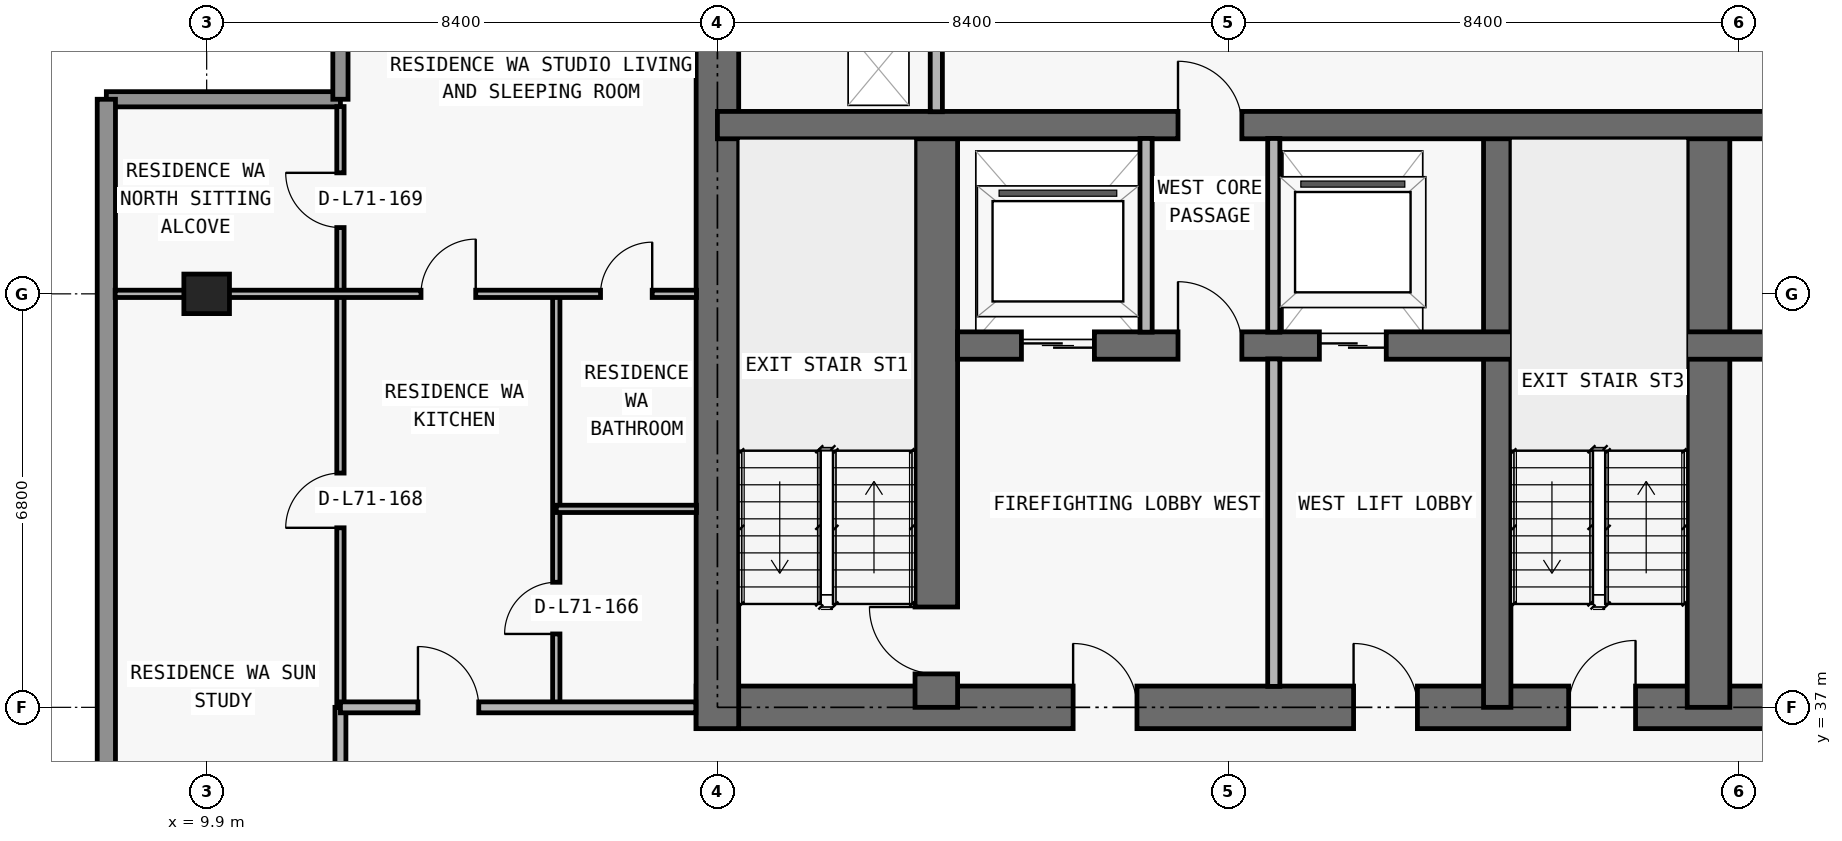
"""IFC4 building model, lengths in metres.
Left out: names, types, materials, properties, quantities, classifications, styles, units other than length and angle.
Written with IfcOpenShell. Run it as: python <this file> out.ifc"""

import sys

from ifc_helpers import new_model, si_unit, direction, frame, frame_2d, origin, origin_2d, place, context, subcontext, project, spatial, rectangle, extrude, element, fill, save


model = new_model("IFC4")
c1 = context("Model", 3, precision=1e-05, world=origin(), true_north=direction((0.0, 1.0)))
c2 = subcontext(c1, "Body", "Model", "MODEL_VIEW")
j1 = project(units=[si_unit("LENGTHUNIT", "METRE"), si_unit("PLANEANGLEUNIT", "RADIAN")], contexts=[c1])
p1 = place(None, origin())
s1 = spatial("IfcSite", under=j1, at=p1, CompositionType="ELEMENT")
p2 = place(p1, origin())
s2 = spatial("IfcBuilding", under=s1, at=p2, CompositionType="ELEMENT")
p3 = place(p2, frame((0.0, 0.0, 252.9)))
s3 = spatial("IfcBuildingStorey", under=s2, at=p3, CompositionType="ELEMENT", Elevation=252.9)
p4 = place(p3, frame((9.9, 43.8, 0.0), z_axis=(0.0, 0.0, 1.0), x_axis=(1.0, 0.0, 0.0)))
e1 = element("IfcColumn", 1, at=p4, inside=s3, PredefinedType="COLUMN", context=c2, shape_type="SweptSolid", body=[
    extrude(rectangle(XDim=0.75, YDim=0.65, at=origin_2d()), origin(), (0.0, 0.0, 1.0), 3.05),
])
p5 = place(p3, frame((17.95, 37.0, 0.0), z_axis=(0.0, 0.0, 1.0), x_axis=(1.0, 0.0, 0.0)))
e2 = element("IfcWall", 2, at=p5, inside=s3, PredefinedType="SHEAR", context=c2, shape_type="SweptSolid", body=[
    extrude(rectangle(XDim=41.9, YDim=0.7, at=frame_2d((20.95, 0.0))), origin(), (0.0, 0.0, 1.0), 3.05),
])
p6 = place(p5, frame((14.35, 0.0, 0.0)))
e3 = element("IfcOpeningElement", 3, at=p6, cuts=e2, PredefinedType="OPENING", context=c2, shape_type="SweptSolid", body=[
    extrude(rectangle(XDim=1.1, YDim=2.15, at=frame_2d((0.55, 1.075))), frame((0.0, 0.36, 0.0), z_axis=(0.0, -1.0, 0.0), x_axis=(1.0, 0.0, 0.0)), (0.0, 0.0, 1.0), 0.72),
])
p7 = place(p5, frame((6.2, 0.0, 0.0)))
e4 = element("IfcOpeningElement", 4, at=p7, cuts=e2, PredefinedType="OPENING", context=c2, shape_type="SweptSolid", body=[
    extrude(rectangle(XDim=1.05, YDim=2.15, at=frame_2d((0.525, 1.075))), frame((0.0, 0.36, 0.0), z_axis=(0.0, -1.0, 0.0), x_axis=(1.0, 0.0, 0.0)), (0.0, 0.0, 1.0), 0.72),
])
p8 = place(p5, frame((34.7, 0.0, 0.0)))
e5 = element("IfcOpeningElement", 5, at=p8, cuts=e2, PredefinedType="OPENING", context=c2, shape_type="SweptSolid", body=[
    extrude(rectangle(XDim=1.05, YDim=2.15, at=frame_2d((0.525, 1.075))), frame((0.0, 0.36, 0.0), z_axis=(0.0, -1.0, 0.0), x_axis=(1.0, 0.0, 0.0)), (0.0, 0.0, 1.0), 0.72),
])
p9 = place(p5, frame((10.812, 0.0, 0.0)))
e6 = element("IfcOpeningElement", 6, at=p9, cuts=e2, PredefinedType="OPENING", context=c2, shape_type="SweptSolid", body=[
    extrude(rectangle(XDim=1.05, YDim=2.15, at=frame_2d((0.525, 1.075))), frame((0.0, 0.36, 0.0), z_axis=(0.0, -1.0, 0.0), x_axis=(1.0, 0.0, 0.0)), (0.0, 0.0, 1.0), 0.72),
])
p10 = place(p5, frame((24.05, 0.0, 0.0)))
e7 = element("IfcOpeningElement", 7, at=p10, cuts=e2, PredefinedType="OPENING", context=c2, shape_type="SweptSolid", body=[
    extrude(rectangle(XDim=1.05, YDim=2.15, at=frame_2d((0.525, 1.075))), frame((0.0, 0.36, 0.0), z_axis=(0.0, -1.0, 0.0), x_axis=(1.0, 0.0, 0.0)), (0.0, 0.0, 1.0), 0.72),
])
p11 = place(p3, frame((18.3, 36.65, 0.0), z_axis=(0.0, 0.0, 1.0), x_axis=(0.0, 1.0, 0.0)))
e8 = element("IfcWall", 8, at=p11, inside=s3, PredefinedType="SHEAR", context=c2, shape_type="SweptSolid", body=[
    extrude(rectangle(XDim=13.95, YDim=0.7, at=frame_2d((6.975, 0.0))), origin(), (0.0, 0.0, 1.0), 3.05),
])
p12 = place(p3, frame((21.9, 37.0, 0.0), z_axis=(0.0, 0.0, 1.0), x_axis=(0.0, 1.0, 0.0)))
e9 = element("IfcWall", 9, at=p12, inside=s3, PredefinedType="SHEAR", context=c2, shape_type="SweptSolid", body=[
    extrude(rectangle(XDim=9.575, YDim=0.7, at=frame_2d((4.788, 0.0))), origin(), (0.0, 0.0, 1.0), 3.05),
])
p13 = place(p12, frame((0.55, 0.0, 0.0)))
e10 = element("IfcOpeningElement", 10, at=p13, cuts=e9, PredefinedType="OPENING", context=c2, shape_type="SweptSolid", body=[
    extrude(rectangle(XDim=1.1, YDim=2.15, at=frame_2d((0.55, 1.075))), frame((0.0, 0.36, 0.0), z_axis=(0.0, -1.0, 0.0), x_axis=(1.0, 0.0, 0.0)), (0.0, 0.0, 1.0), 0.72),
])
p14 = place(p3, frame((31.125, 37.0, 0.0), z_axis=(0.0, 0.0, 1.0), x_axis=(0.0, 1.0, 0.0)))
e11 = element("IfcWall", 11, at=p14, inside=s3, PredefinedType="SHEAR", context=c2, shape_type="SweptSolid", body=[
    extrude(rectangle(XDim=9.575, YDim=0.45, at=frame_2d((4.788, 0.0))), origin(), (0.0, 0.0, 1.0), 3.05),
])
p15 = place(p3, frame((34.6, 37.0, 0.0), z_axis=(0.0, 0.0, 1.0), x_axis=(0.0, 1.0, 0.0)))
e12 = element("IfcWall", 12, at=p15, inside=s3, PredefinedType="SHEAR", context=c2, shape_type="SweptSolid", body=[
    extrude(rectangle(XDim=9.575, YDim=0.7, at=frame_2d((4.788, 0.0))), origin(), (0.0, 0.0, 1.0), 3.05),
])
p16 = place(p3, frame((22.25, 42.95, 0.0), z_axis=(0.0, 0.0, 1.0), x_axis=(1.0, 0.0, 0.0)))
e13 = element("IfcWall", 13, at=p16, inside=s3, PredefinedType="SHEAR", context=c2, shape_type="SweptSolid", body=[
    extrude(rectangle(XDim=33.3, YDim=0.45, at=frame_2d((16.65, 0.0))), origin(), (0.0, 0.0, 1.0), 3.05),
])
p17 = place(p16, frame((1.05, 0.0, 0.0)))
e14 = element("IfcOpeningElement", 14, at=p17, cuts=e13, PredefinedType="OPENING", context=c2, shape_type="SweptSolid", body=[
    extrude(rectangle(XDim=1.2, YDim=2.2, at=frame_2d((0.6, 1.1))), frame((0.0, 0.235, 0.0), z_axis=(0.0, -1.0, 0.0), x_axis=(1.0, 0.0, 0.0)), (0.0, 0.0, 1.0), 0.47),
])
p18 = place(p16, frame((31.05, 0.0, 0.0)))
e15 = element("IfcOpeningElement", 15, at=p18, cuts=e13, PredefinedType="OPENING", context=c2, shape_type="SweptSolid", body=[
    extrude(rectangle(XDim=1.2, YDim=2.2, at=frame_2d((0.6, 1.1))), frame((0.0, 0.235, 0.0), z_axis=(0.0, -1.0, 0.0), x_axis=(1.0, 0.0, 0.0)), (0.0, 0.0, 1.0), 0.47),
])
p19 = place(p16, frame((26.45, 0.0, 0.0)))
e16 = element("IfcOpeningElement", 16, at=p19, cuts=e13, PredefinedType="OPENING", context=c2, shape_type="SweptSolid", body=[
    extrude(rectangle(XDim=1.1, YDim=2.2, at=frame_2d((0.55, 1.1))), frame((0.0, 0.235, 0.0), z_axis=(0.0, -1.0, 0.0), x_axis=(1.0, 0.0, 0.0)), (0.0, 0.0, 1.0), 0.47),
])
p20 = place(p16, frame((5.95, 0.0, 0.0)))
e17 = element("IfcOpeningElement", 17, at=p20, cuts=e13, PredefinedType="OPENING", context=c2, shape_type="SweptSolid", body=[
    extrude(rectangle(XDim=1.1, YDim=2.2, at=frame_2d((0.55, 1.1))), frame((0.0, 0.235, 0.0), z_axis=(0.0, -1.0, 0.0), x_axis=(1.0, 0.0, 0.0)), (0.0, 0.0, 1.0), 0.47),
])
p21 = place(p16, frame((3.625, 0.0, 0.0)))
e18 = element("IfcOpeningElement", 18, at=p21, cuts=e13, PredefinedType="OPENING", context=c2, shape_type="SweptSolid", body=[
    extrude(rectangle(XDim=1.05, YDim=2.15, at=frame_2d((0.525, 1.075))), frame((0.0, 0.235, 0.0), z_axis=(0.0, -1.0, 0.0), x_axis=(1.0, 0.0, 0.0)), (0.0, 0.0, 1.0), 0.47),
])
p22 = place(p16, frame((28.675, 0.0, 0.0)))
e19 = element("IfcOpeningElement", 19, at=p22, cuts=e13, PredefinedType="OPENING", context=c2, shape_type="SweptSolid", body=[
    extrude(rectangle(XDim=1.05, YDim=2.15, at=frame_2d((0.525, 1.075))), frame((0.0, 0.235, 0.0), z_axis=(0.0, -1.0, 0.0), x_axis=(1.0, 0.0, 0.0)), (0.0, 0.0, 1.0), 0.47),
])
p23 = place(p16, frame((15.225, 0.0, 0.0)))
e20 = element("IfcOpeningElement", 20, at=p23, cuts=e13, PredefinedType="OPENING", context=c2, shape_type="SweptSolid", body=[
    extrude(rectangle(XDim=1.0, YDim=2.2, at=frame_2d((0.5, 1.1))), frame((0.0, 0.235, 0.0), z_axis=(0.0, -1.0, 0.0), x_axis=(1.0, 0.0, 0.0)), (0.0, 0.0, 1.0), 0.47),
])
p24 = place(p16, frame((21.975, 0.0, 0.0)))
e21 = element("IfcOpeningElement", 21, at=p24, cuts=e13, PredefinedType="OPENING", context=c2, shape_type="SweptSolid", body=[
    extrude(rectangle(XDim=1.0, YDim=2.2, at=frame_2d((0.5, 1.1))), frame((0.0, 0.235, 0.0), z_axis=(0.0, -1.0, 0.0), x_axis=(1.0, 0.0, 0.0)), (0.0, 0.0, 1.0), 0.47),
])
p25 = place(p3, frame((18.3, 46.575, 0.0), z_axis=(0.0, 0.0, 1.0), x_axis=(1.0, 0.0, 0.0)))
e22 = element("IfcWall", 22, at=p25, inside=s3, PredefinedType="SHEAR", context=c2, shape_type="SweptSolid", body=[
    extrude(rectangle(XDim=41.2, YDim=0.45, at=frame_2d((20.6, 0.0))), origin(), (0.0, 0.0, 1.0), 3.05),
])
p26 = place(p25, frame((7.575, 0.0, 0.0)))
e23 = element("IfcOpeningElement", 23, at=p26, cuts=e22, PredefinedType="OPENING", context=c2, shape_type="SweptSolid", body=[
    extrude(rectangle(XDim=1.05, YDim=2.15, at=frame_2d((0.525, 1.075))), frame((0.0, 0.235, 0.0), z_axis=(0.0, -1.0, 0.0), x_axis=(1.0, 0.0, 0.0)), (0.0, 0.0, 1.0), 0.47),
])
p27 = place(p25, frame((32.625, 0.0, 0.0)))
e24 = element("IfcOpeningElement", 24, at=p27, cuts=e22, PredefinedType="OPENING", context=c2, shape_type="SweptSolid", body=[
    extrude(rectangle(XDim=1.05, YDim=2.15, at=frame_2d((0.525, 1.075))), frame((0.0, 0.235, 0.0), z_axis=(0.0, -1.0, 0.0), x_axis=(1.0, 0.0, 0.0)), (0.0, 0.0, 1.0), 0.47),
])
p28 = place(p3, frame((8.25, 47.0, 0.0), z_axis=(0.0, 0.0, 1.0), x_axis=(1.0, 0.0, 0.0)))
e25 = element("IfcWall", 25, at=p28, inside=s3, PredefinedType="ELEMENTEDWALL", context=c2, shape_type="SweptSolid", body=[
    extrude(rectangle(XDim=3.85, YDim=0.25, at=frame_2d((1.925, 0.0))), origin(), (0.0, 0.0, 1.0), 3.05),
])
p29 = place(p3, frame((12.1, 47.0, 0.0), z_axis=(0.0, 0.0, 1.0), x_axis=(0.0, 1.0, 0.0)))
e26 = element("IfcWall", 26, at=p29, inside=s3, PredefinedType="ELEMENTEDWALL", context=c2, shape_type="SweptSolid", body=[
    extrude(rectangle(XDim=3.45, YDim=0.25, at=frame_2d((1.725, 0.0))), origin(), (0.0, 0.0, 1.0), 3.05),
])
p30 = place(p3, frame((8.25, 30.15, 0.0), z_axis=(0.0, 0.0, 1.0), x_axis=(0.0, 1.0, 0.0)))
e27 = element("IfcWall", 27, at=p30, inside=s3, PredefinedType="STANDARD", context=c2, shape_type="SweptSolid", body=[
    extrude(rectangle(XDim=16.85, YDim=0.3, at=frame_2d((8.425, 0.0))), origin(), (0.0, 0.0, 1.0), 3.05),
])
p31 = place(p3, frame((12.1, 34.705, 0.0), z_axis=(0.0, 0.0, 1.0), x_axis=(0.0, 1.0, 0.0)))
e28 = element("IfcWall", 28, at=p31, inside=s3, PredefinedType="PARTITIONING", context=c2, shape_type="SweptSolid", body=[
    extrude(rectangle(XDim=2.295, YDim=0.18, at=frame_2d((1.147, 0.0))), origin(), (0.0, 0.0, 1.0), 3.05),
])
p32 = place(p3, frame((12.1, 37.005, 0.0), z_axis=(0.0, 0.0, 1.0), x_axis=(0.0, 1.0, 0.0)))
e29 = element("IfcWall", 29, at=p32, inside=s3, PredefinedType="PARTITIONING", context=c2, shape_type="SweptSolid", body=[
    extrude(rectangle(XDim=9.875, YDim=0.12, at=frame_2d((4.938, 0.0))), origin(), (0.0, 0.0, 1.0), 3.05),
])
p33 = place(p32, frame((2.948, 0.0, 0.0)))
e30 = element("IfcOpeningElement", 30, at=p33, cuts=e29, PredefinedType="OPENING", context=c2, shape_type="SweptSolid", body=[
    extrude(rectangle(XDim=0.9, YDim=2.15, at=frame_2d((0.45, 1.075))), frame((0.0, 0.07, 0.0), z_axis=(0.0, -1.0, 0.0), x_axis=(1.0, 0.0, 0.0)), (0.0, 0.0, 1.0), 0.14),
])
p34 = place(p32, frame((7.885, 0.0, 0.0)))
e31 = element("IfcOpeningElement", 31, at=p34, cuts=e29, PredefinedType="OPENING", context=c2, shape_type="SweptSolid", body=[
    extrude(rectangle(XDim=0.9, YDim=2.15, at=frame_2d((0.45, 1.075))), frame((0.0, 0.07, 0.0), z_axis=(0.0, -1.0, 0.0), x_axis=(1.0, 0.0, 0.0)), (0.0, 0.0, 1.0), 0.14),
])
p35 = place(p3, frame((15.65, 37.0, 0.0), z_axis=(0.0, 0.0, 1.0), x_axis=(0.0, 1.0, 0.0)))
e32 = element("IfcWall", 32, at=p35, inside=s3, PredefinedType="PARTITIONING", context=c2, shape_type="SweptSolid", body=[
    extrude(rectangle(XDim=6.8, YDim=0.12, at=frame_2d((3.4, 0.0))), origin(), (0.0, 0.0, 1.0), 3.05),
])
p36 = place(p35, frame((1.207, 0.0, 0.0)))
e33 = element("IfcOpeningElement", 33, at=p36, cuts=e32, PredefinedType="OPENING", context=c2, shape_type="SweptSolid", body=[
    extrude(rectangle(XDim=0.85, YDim=2.1, at=frame_2d((0.425, 1.05))), frame((0.0, 0.07, 0.0), z_axis=(0.0, -1.0, 0.0), x_axis=(1.0, 0.0, 0.0)), (0.0, 0.0, 1.0), 0.14),
])
p37 = place(p3, frame((21.9, 46.795, 0.0), z_axis=(0.0, 0.0, 1.0), x_axis=(0.0, 1.0, 0.0)))
e34 = element("IfcWall", 34, at=p37, inside=s3, PredefinedType="PARTITIONING", context=c2, shape_type="SweptSolid", body=[
    extrude(rectangle(XDim=3.16, YDim=0.2, at=frame_2d((1.58, 0.0))), origin(), (0.0, 0.0, 1.0), 3.05),
])
p38 = place(p3, frame((25.35, 43.17, 0.0), z_axis=(0.0, 0.0, 1.0), x_axis=(0.0, 1.0, 0.0)))
e35 = element("IfcWall", 35, at=p38, inside=s3, PredefinedType="PARTITIONING", context=c2, shape_type="SweptSolid", body=[
    extrude(rectangle(XDim=3.185, YDim=0.2, at=frame_2d((1.593, 0.0))), origin(), (0.0, 0.0, 1.0), 3.05),
])
p39 = place(p3, frame((27.45, 37.345, 0.0), z_axis=(0.0, 0.0, 1.0), x_axis=(0.0, 1.0, 0.0)))
e36 = element("IfcWall", 36, at=p39, inside=s3, PredefinedType="PARTITIONING", context=c2, shape_type="SweptSolid", body=[
    extrude(rectangle(XDim=5.385, YDim=0.2, at=frame_2d((2.692, 0.0))), origin(), (0.0, 0.0, 1.0), 3.05),
])
p40 = place(p3, frame((27.45, 43.17, 0.0), z_axis=(0.0, 0.0, 1.0), x_axis=(0.0, 1.0, 0.0)))
e37 = element("IfcWall", 37, at=p40, inside=s3, PredefinedType="PARTITIONING", context=c2, shape_type="SweptSolid", body=[
    extrude(rectangle(XDim=3.185, YDim=0.2, at=frame_2d((1.593, 0.0))), origin(), (0.0, 0.0, 1.0), 3.05),
])
p41 = place(p3, frame((12.1, 37.0, 0.0), z_axis=(0.0, 0.0, 1.0), x_axis=(1.0, 0.0, 0.0)))
e38 = element("IfcWall", 38, at=p41, inside=s3, PredefinedType="PARTITIONING", context=c2, shape_type="SweptSolid", body=[
    extrude(rectangle(XDim=5.845, YDim=0.18, at=frame_2d((2.922, 0.0))), origin(), (0.0, 0.0, 1.0), 3.05),
])
p42 = place(p41, frame((1.275, 0.0, 0.0)))
e39 = element("IfcOpeningElement", 39, at=p42, cuts=e38, PredefinedType="OPENING", context=c2, shape_type="SweptSolid", body=[
    extrude(rectangle(XDim=1.0, YDim=2.2, at=frame_2d((0.5, 1.1))), frame((0.0, 0.1, 0.0), z_axis=(0.0, -1.0, 0.0), x_axis=(1.0, 0.0, 0.0)), (0.0, 0.0, 1.0), 0.2),
])
p43 = place(p3, frame((15.65, 40.264, 0.0), z_axis=(0.0, 0.0, 1.0), x_axis=(1.0, 0.0, 0.0)))
e40 = element("IfcWall", 40, at=p43, inside=s3, PredefinedType="PARTITIONING", context=c2, shape_type="SweptSolid", body=[
    extrude(rectangle(XDim=2.305, YDim=0.12, at=frame_2d((1.153, 0.0))), origin(), (0.0, 0.0, 1.0), 3.05),
])
p44 = place(p3, frame((8.395, 43.8, 0.0), z_axis=(0.0, 0.0, 1.0), x_axis=(1.0, 0.0, 0.0)))
e41 = element("IfcWall", 41, at=p44, inside=s3, PredefinedType="PARTITIONING", context=c2, shape_type="SweptSolid", body=[
    extrude(rectangle(XDim=9.56, YDim=0.12, at=frame_2d((4.78, 0.0))), origin(), (0.0, 0.0, 1.0), 2.418),
])
p45 = place(p44, frame((5.03, 0.0, 0.0)))
e42 = element("IfcOpeningElement", 42, at=p45, cuts=e41, PredefinedType="OPENING", context=c2, shape_type="SweptSolid", body=[
    extrude(rectangle(XDim=0.9, YDim=2.15, at=frame_2d((0.45, 1.075))), frame((0.0, 0.07, 0.0), z_axis=(0.0, -1.0, 0.0), x_axis=(1.0, 0.0, 0.0)), (0.0, 0.0, 1.0), 0.14),
])
p46 = place(p44, frame((7.982, 0.0, 0.0)))
e43 = element("IfcOpeningElement", 43, at=p46, cuts=e41, PredefinedType="OPENING", context=c2, shape_type="SweptSolid", body=[
    extrude(rectangle(XDim=0.85, YDim=2.1, at=frame_2d((0.425, 1.05))), frame((0.0, 0.07, 0.0), z_axis=(0.0, -1.0, 0.0), x_axis=(1.0, 0.0, 0.0)), (0.0, 0.0, 1.0), 0.14),
])
p47 = place(p17, origin())
e44 = element("IfcDoor", 44, at=p47, inside=s3, OperationType="DOUBLE_DOOR_SLIDING", PredefinedType="DOOR", context=c2, shape_type="SweptSolid", body=[
    extrude(rectangle(XDim=1.2, YDim=2.2, at=frame_2d((0.6, 1.1))), frame((0.0, 0.025, 0.0), z_axis=(0.0, -1.0, 0.0), x_axis=(1.0, 0.0, 0.0)), (0.0, 0.0, 1.0), 0.05),
])
fill(e14, e44)
p48 = place(p20, origin())
e45 = element("IfcDoor", 45, at=p48, inside=s3, OperationType="DOUBLE_DOOR_SLIDING", PredefinedType="DOOR", context=c2, shape_type="SweptSolid", body=[
    extrude(rectangle(XDim=1.1, YDim=2.2, at=frame_2d((0.55, 1.1))), frame((0.0, 0.025, 0.0), z_axis=(0.0, -1.0, 0.0), x_axis=(1.0, 0.0, 0.0)), (0.0, 0.0, 1.0), 0.05),
])
fill(e17, e45)
p49 = place(p6, origin())
e46 = element("IfcDoor", 46, at=p49, inside=s3, OperationType="SINGLE_SWING_RIGHT", PredefinedType="DOOR", context=c2, shape_type="SweptSolid", body=[
    extrude(rectangle(XDim=1.1, YDim=2.15, at=frame_2d((0.55, 1.075))), frame((0.0, 0.025, 0.0), z_axis=(0.0, -1.0, 0.0), x_axis=(1.0, 0.0, 0.0)), (0.0, 0.0, 1.0), 0.05),
])
fill(e3, e46)
p50 = place(p7, origin())
e47 = element("IfcDoor", 47, at=p50, inside=s3, OperationType="SINGLE_SWING_LEFT", PredefinedType="DOOR", context=c2, shape_type="SweptSolid", body=[
    extrude(rectangle(XDim=1.05, YDim=2.15, at=frame_2d((0.525, 1.075))), frame((0.0, 0.025, 0.0), z_axis=(0.0, -1.0, 0.0), x_axis=(1.0, 0.0, 0.0)), (0.0, 0.0, 1.0), 0.05),
])
fill(e4, e47)
p51 = place(p13, origin())
e48 = element("IfcDoor", 48, at=p51, inside=s3, OperationType="SINGLE_SWING_RIGHT", PredefinedType="DOOR", context=c2, shape_type="SweptSolid", body=[
    extrude(rectangle(XDim=1.1, YDim=2.15, at=frame_2d((0.55, 1.075))), frame((0.0, 0.025, 0.0), z_axis=(0.0, -1.0, 0.0), x_axis=(1.0, 0.0, 0.0)), (0.0, 0.0, 1.0), 0.05),
])
fill(e10, e48)
p52 = place(p21, origin())
e49 = element("IfcDoor", 49, at=p52, inside=s3, OperationType="SINGLE_SWING_LEFT", PredefinedType="DOOR", context=c2, shape_type="SweptSolid", body=[
    extrude(rectangle(XDim=1.05, YDim=2.15, at=frame_2d((0.525, 1.075))), frame((0.0, 0.025, 0.0), z_axis=(0.0, -1.0, 0.0), x_axis=(1.0, 0.0, 0.0)), (0.0, 0.0, 1.0), 0.05),
])
fill(e18, e49)
p53 = place(p9, origin())
e50 = element("IfcDoor", 50, at=p53, inside=s3, OperationType="SINGLE_SWING_LEFT", PredefinedType="DOOR", context=c2, shape_type="SweptSolid", body=[
    extrude(rectangle(XDim=1.05, YDim=2.15, at=frame_2d((0.525, 1.075))), frame((0.0, 0.025, 0.0), z_axis=(0.0, -1.0, 0.0), x_axis=(1.0, 0.0, 0.0)), (0.0, 0.0, 1.0), 0.05),
])
fill(e6, e50)
p54 = place(p26, origin())
e51 = element("IfcDoor", 51, at=p54, inside=s3, OperationType="SINGLE_SWING_LEFT", PredefinedType="DOOR", context=c2, shape_type="SweptSolid", body=[
    extrude(rectangle(XDim=1.05, YDim=2.15, at=frame_2d((0.525, 1.075))), frame((0.0, 0.025, 0.0), z_axis=(0.0, -1.0, 0.0), x_axis=(1.0, 0.0, 0.0)), (0.0, 0.0, 1.0), 0.05),
])
fill(e23, e51)
p55 = place(p42, origin())
e52 = element("IfcDoor", 52, at=p55, inside=s3, OperationType="SINGLE_SWING_LEFT", PredefinedType="DOOR", context=c2, shape_type="SweptSolid", body=[
    extrude(rectangle(XDim=1.0, YDim=2.2, at=frame_2d((0.5, 1.1))), frame((0.0, 0.025, 0.0), z_axis=(0.0, -1.0, 0.0), x_axis=(1.0, 0.0, 0.0)), (0.0, 0.0, 1.0), 0.05),
])
fill(e39, e52)
p56 = place(p45, origin())
e53 = element("IfcDoor", 53, at=p56, inside=s3, OperationType="SINGLE_SWING_RIGHT", PredefinedType="DOOR", context=c2, shape_type="SweptSolid", body=[
    extrude(rectangle(XDim=0.9, YDim=2.15, at=frame_2d((0.45, 1.075))), frame((0.0, 0.025, 0.0), z_axis=(0.0, -1.0, 0.0), x_axis=(1.0, 0.0, 0.0)), (0.0, 0.0, 1.0), 0.05),
])
fill(e42, e53)
p57 = place(p36, origin())
e54 = element("IfcDoor", 54, at=p57, inside=s3, OperationType="SINGLE_SWING_LEFT", PredefinedType="DOOR", context=c2, shape_type="SweptSolid", body=[
    extrude(rectangle(XDim=0.85, YDim=2.1, at=frame_2d((0.425, 1.05))), frame((0.0, 0.025, 0.0), z_axis=(0.0, -1.0, 0.0), x_axis=(1.0, 0.0, 0.0)), (0.0, 0.0, 1.0), 0.05),
])
fill(e33, e54)
p58 = place(p46, origin())
e55 = element("IfcDoor", 55, at=p58, inside=s3, OperationType="SINGLE_SWING_RIGHT", PredefinedType="DOOR", context=c2, shape_type="SweptSolid", body=[
    extrude(rectangle(XDim=0.85, YDim=2.1, at=frame_2d((0.425, 1.05))), frame((0.0, 0.025, 0.0), z_axis=(0.0, -1.0, 0.0), x_axis=(1.0, 0.0, 0.0)), (0.0, 0.0, 1.0), 0.05),
])
fill(e43, e55)
p59 = place(p33, origin())
e56 = element("IfcDoor", 56, at=p59, inside=s3, OperationType="SINGLE_SWING_LEFT", PredefinedType="DOOR", context=c2, shape_type="SweptSolid", body=[
    extrude(rectangle(XDim=0.9, YDim=2.15, at=frame_2d((0.45, 1.075))), frame((0.0, 0.025, 0.0), z_axis=(0.0, -1.0, 0.0), x_axis=(1.0, 0.0, 0.0)), (0.0, 0.0, 1.0), 0.05),
])
fill(e30, e56)
p60 = place(p34, origin())
e57 = element("IfcDoor", 57, at=p60, inside=s3, OperationType="SINGLE_SWING_RIGHT", PredefinedType="DOOR", context=c2, shape_type="SweptSolid", body=[
    extrude(rectangle(XDim=0.9, YDim=2.15, at=frame_2d((0.45, 1.075))), frame((0.0, 0.025, 0.0), z_axis=(0.0, -1.0, 0.0), x_axis=(1.0, 0.0, 0.0)), (0.0, 0.0, 1.0), 0.05),
])
fill(e31, e57)
save(model, sys.argv[1])
